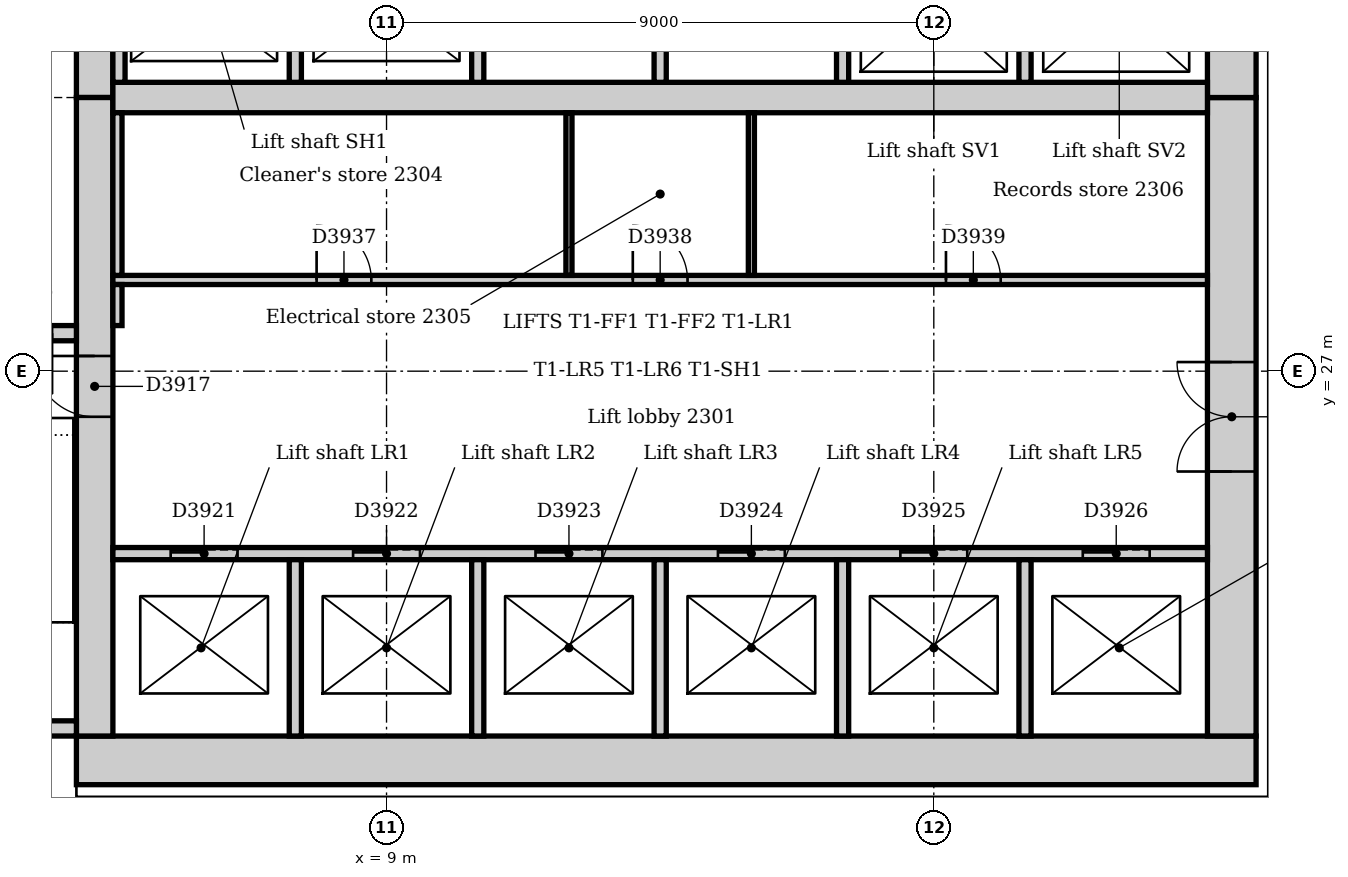
"""IFC4 building model, lengths in metres.
Left out: names, types, materials, properties, quantities, classifications, styles, units other than length and angle.
Written with IfcOpenShell. Run it as: python <this file> out.ifc"""

import sys

from ifc_helpers import new_model, si_unit, direction, frame, frame_2d, origin, place, context, subcontext, project, spatial, rectangle, extrude, element, fill, save


model = new_model("IFC4")
c1 = context("Model", 3, precision=1e-05, world=origin(), true_north=direction((0.0, 1.0)))
c2 = subcontext(c1, "Body", "Model", "MODEL_VIEW")
j1 = project(units=[si_unit("LENGTHUNIT", "METRE"), si_unit("PLANEANGLEUNIT", "RADIAN")], contexts=[c1])
p1 = place(None, origin())
s1 = spatial("IfcSite", under=j1, at=p1, CompositionType="ELEMENT")
p2 = place(p1, origin())
s2 = spatial("IfcBuilding", under=s1, at=p2, CompositionType="ELEMENT")
p3 = place(p2, frame((0.0, 0.0, 100.0)))
s3 = spatial("IfcBuildingStorey", under=s2, at=p3, CompositionType="ELEMENT", Elevation=100.0)
p4 = place(p3, frame((3.9, 20.6, 0.0), z_axis=(0.0, 0.0, 1.0), x_axis=(1.0, 0.0, 0.0)))
e1 = element("IfcWall", 1, at=p4, inside=s3, PredefinedType="SOLIDWALL", context=c2, shape_type="SweptSolid", body=[
    extrude(rectangle(XDim=19.4, YDim=0.8, at=frame_2d((9.7, 0.0))), origin(), (0.0, 0.0, 1.0), 4.0),
])
p5 = place(p3, frame((22.9, 21.0, 0.0), z_axis=(0.0, 0.0, 1.0), x_axis=(0.0, 1.0, 0.0)))
e2 = element("IfcWall", 2, at=p5, inside=s3, PredefinedType="SOLIDWALL", context=c2, shape_type="SweptSolid", body=[
    extrude(rectangle(XDim=10.5, YDim=0.8, at=frame_2d((5.25, 0.0))), origin(), (0.0, 0.0, 1.0), 4.0),
])
p6 = place(p5, frame((4.35, 0.0, 0.0)))
e3 = element("IfcOpeningElement", 3, at=p6, cuts=e2, PredefinedType="OPENING", context=c2, shape_type="SweptSolid", body=[
    extrude(rectangle(XDim=1.8, YDim=2.1, at=frame_2d((0.9, 1.05))), frame((0.0, 0.41, 0.0), z_axis=(0.0, -1.0, 0.0), x_axis=(1.0, 0.0, 0.0)), (0.0, 0.0, 1.0), 0.82),
])
p7 = place(p3, frame((22.9, 31.5, 0.0), z_axis=(0.0, 0.0, 1.0), x_axis=(0.0, 1.0, 0.0)))
e4 = element("IfcWall", 4, at=p7, inside=s3, PredefinedType="SOLIDWALL", context=c2, shape_type="SweptSolid", body=[
    extrude(rectangle(XDim=10.5, YDim=0.8, at=frame_2d((5.25, 0.0))), origin(), (0.0, 0.0, 1.0), 4.0),
])
p8 = place(p7, frame((3.15, 0.0, 0.0)))
e5 = element("IfcOpeningElement", 5, at=p8, cuts=e4, PredefinedType="OPENING", context=c2, shape_type="SweptSolid", body=[
    extrude(rectangle(XDim=1.0, YDim=2.1, at=frame_2d((0.5, 1.05))), frame((0.0, 0.41, 0.0), z_axis=(0.0, -1.0, 0.0), x_axis=(1.0, 0.0, 0.0)), (0.0, 0.0, 1.0), 0.82),
])
p9 = place(p7, frame((5.2, 0.0, 0.0)))
e6 = element("IfcOpeningElement", 6, at=p9, cuts=e4, PredefinedType="OPENING", context=c2, shape_type="SweptSolid", body=[
    extrude(rectangle(XDim=1.0, YDim=2.1, at=frame_2d((0.5, 1.05))), frame((0.0, 0.41, 0.0), z_axis=(0.0, -1.0, 0.0), x_axis=(1.0, 0.0, 0.0)), (0.0, 0.0, 1.0), 0.82),
])
p10 = place(p3, frame((4.2, 42.0, 0.0), z_axis=(0.0, 0.0, 1.0), x_axis=(0.0, -1.0, 0.0)))
e7 = element("IfcWall", 7, at=p10, inside=s3, PredefinedType="SOLIDWALL", context=c2, shape_type="SweptSolid", body=[
    extrude(rectangle(XDim=10.5, YDim=0.6, at=frame_2d((5.25, 0.0))), origin(), (0.0, 0.0, 1.0), 4.0),
])
p11 = place(p10, frame((5.3, 0.0, 0.0)))
e8 = element("IfcOpeningElement", 8, at=p11, cuts=e7, PredefinedType="OPENING", context=c2, shape_type="SweptSolid", body=[
    extrude(rectangle(XDim=1.0, YDim=2.1, at=frame_2d((0.5, 1.05))), frame((0.0, 0.31, 0.0), z_axis=(0.0, -1.0, 0.0), x_axis=(1.0, 0.0, 0.0)), (0.0, 0.0, 1.0), 0.62),
])
p12 = place(p3, frame((4.2, 31.5, 0.0), z_axis=(0.0, 0.0, 1.0), x_axis=(0.0, -1.0, 0.0)))
e9 = element("IfcWall", 9, at=p12, inside=s3, PredefinedType="SOLIDWALL", context=c2, shape_type="SweptSolid", body=[
    extrude(rectangle(XDim=10.5, YDim=0.6, at=frame_2d((5.25, 0.0))), origin(), (0.0, 0.0, 1.0), 4.0),
])
p13 = place(p12, frame((4.25, 0.0, 0.0)))
e10 = element("IfcOpeningElement", 10, at=p13, cuts=e9, PredefinedType="OPENING", context=c2, shape_type="SweptSolid", body=[
    extrude(rectangle(XDim=1.0, YDim=2.1, at=frame_2d((0.5, 1.05))), frame((0.0, 0.31, 0.0), z_axis=(0.0, -1.0, 0.0), x_axis=(1.0, 0.0, 0.0)), (0.0, 0.0, 1.0), 0.62),
])
p14 = place(p3, frame((4.5, 31.5, 0.0), z_axis=(0.0, 0.0, 1.0), x_axis=(1.0, 0.0, 0.0)))
e11 = element("IfcWall", 11, at=p14, inside=s3, PredefinedType="SOLIDWALL", context=c2, shape_type="SweptSolid", body=[
    extrude(rectangle(XDim=18.0, YDim=0.5, at=frame_2d((9.0, 0.0))), origin(), (0.0, 0.0, 1.0), 4.0),
])
p15 = place(p3, frame((0.36, 21.125, 0.0), z_axis=(0.0, 0.0, 1.0), x_axis=(1.0, 0.0, 0.0)))
e12 = element("IfcWall", 12, at=p15, inside=s3, PredefinedType="SOLIDWALL", context=c2, shape_type="SweptSolid", body=[
    extrude(rectangle(XDim=3.54, YDim=0.25, at=frame_2d((1.77, 0.0))), origin(), (0.0, 0.0, 1.0), 4.0),
])
p16 = place(p3, frame((3.9, 27.625, 0.0), z_axis=(0.0, 0.0, 1.0), x_axis=(-1.0, 0.0, 0.0)))
e13 = element("IfcWall", 13, at=p16, inside=s3, PredefinedType="SOLIDWALL", context=c2, shape_type="SweptSolid", body=[
    extrude(rectangle(XDim=3.54, YDim=0.25, at=frame_2d((1.77, 0.0))), origin(), (0.0, 0.0, 1.0), 4.0),
])
p17 = place(p16, frame((0.4, 0.0, 0.0)))
e14 = element("IfcOpeningElement", 14, at=p17, cuts=e13, PredefinedType="OPENING", context=c2, shape_type="SweptSolid", body=[
    extrude(rectangle(XDim=1.0, YDim=2.1, at=frame_2d((0.5, 1.05))), frame((0.0, 0.135, 0.0), z_axis=(0.0, -1.0, 0.0), x_axis=(1.0, 0.0, 0.0)), (0.0, 0.0, 1.0), 0.27),
])
p18 = place(p3, frame((4.5, 24.0, 0.0), z_axis=(0.0, 0.0, 1.0), x_axis=(1.0, 0.0, 0.0)))
e15 = element("IfcWall", 15, at=p18, inside=s3, PredefinedType="PARTITIONING", context=c2, shape_type="SweptSolid", body=[
    extrude(rectangle(XDim=18.0, YDim=0.2, at=frame_2d((9.0, 0.0))), origin(), (0.0, 0.0, 1.0), 3.85),
])
p19 = place(p18, frame((0.95, 0.0, 0.0)))
e16 = element("IfcOpeningElement", 16, at=p19, cuts=e15, PredefinedType="OPENING", context=c2, shape_type="SweptSolid", body=[
    extrude(rectangle(XDim=1.1, YDim=2.1, at=frame_2d((0.55, 1.05))), frame((0.0, 0.11, 0.0), z_axis=(0.0, -1.0, 0.0), x_axis=(1.0, 0.0, 0.0)), (0.0, 0.0, 1.0), 0.22),
])
p20 = place(p18, frame((3.95, 0.0, 0.0)))
e17 = element("IfcOpeningElement", 17, at=p20, cuts=e15, PredefinedType="OPENING", context=c2, shape_type="SweptSolid", body=[
    extrude(rectangle(XDim=1.1, YDim=2.1, at=frame_2d((0.55, 1.05))), frame((0.0, 0.11, 0.0), z_axis=(0.0, -1.0, 0.0), x_axis=(1.0, 0.0, 0.0)), (0.0, 0.0, 1.0), 0.22),
])
p21 = place(p18, frame((6.95, 0.0, 0.0)))
e18 = element("IfcOpeningElement", 18, at=p21, cuts=e15, PredefinedType="OPENING", context=c2, shape_type="SweptSolid", body=[
    extrude(rectangle(XDim=1.1, YDim=2.1, at=frame_2d((0.55, 1.05))), frame((0.0, 0.11, 0.0), z_axis=(0.0, -1.0, 0.0), x_axis=(1.0, 0.0, 0.0)), (0.0, 0.0, 1.0), 0.22),
])
p22 = place(p18, frame((9.95, 0.0, 0.0)))
e19 = element("IfcOpeningElement", 19, at=p22, cuts=e15, PredefinedType="OPENING", context=c2, shape_type="SweptSolid", body=[
    extrude(rectangle(XDim=1.1, YDim=2.1, at=frame_2d((0.55, 1.05))), frame((0.0, 0.11, 0.0), z_axis=(0.0, -1.0, 0.0), x_axis=(1.0, 0.0, 0.0)), (0.0, 0.0, 1.0), 0.22),
])
p23 = place(p18, frame((12.95, 0.0, 0.0)))
e20 = element("IfcOpeningElement", 20, at=p23, cuts=e15, PredefinedType="OPENING", context=c2, shape_type="SweptSolid", body=[
    extrude(rectangle(XDim=1.1, YDim=2.1, at=frame_2d((0.55, 1.05))), frame((0.0, 0.11, 0.0), z_axis=(0.0, -1.0, 0.0), x_axis=(1.0, 0.0, 0.0)), (0.0, 0.0, 1.0), 0.22),
])
p24 = place(p18, frame((15.95, 0.0, 0.0)))
e21 = element("IfcOpeningElement", 21, at=p24, cuts=e15, PredefinedType="OPENING", context=c2, shape_type="SweptSolid", body=[
    extrude(rectangle(XDim=1.1, YDim=2.1, at=frame_2d((0.55, 1.05))), frame((0.0, 0.11, 0.0), z_axis=(0.0, -1.0, 0.0), x_axis=(1.0, 0.0, 0.0)), (0.0, 0.0, 1.0), 0.22),
])
p25 = place(p3, frame((4.6, 31.75, 0.0), z_axis=(0.0, 0.0, 1.0), x_axis=(0.0, 1.0, 0.0)))
e22 = element("IfcWall", 22, at=p25, inside=s3, PredefinedType="PARTITIONING", context=c2, shape_type="SweptSolid", body=[
    extrude(rectangle(XDim=2.65, YDim=0.2, at=frame_2d((1.325, 0.0))), origin(), (0.0, 0.0, 1.0), 3.85),
])
p26 = place(p3, frame((7.5, 21.0, 0.0), z_axis=(0.0, 0.0, 1.0), x_axis=(0.0, 1.0, 0.0)))
e23 = element("IfcWall", 23, at=p26, inside=s3, PredefinedType="PARTITIONING", context=c2, shape_type="SweptSolid", body=[
    extrude(rectangle(XDim=2.9, YDim=0.2, at=frame_2d((1.45, 0.0))), origin(), (0.0, 0.0, 1.0), 3.85),
])
p27 = place(p3, frame((7.5, 31.75, 0.0), z_axis=(0.0, 0.0, 1.0), x_axis=(0.0, 1.0, 0.0)))
e24 = element("IfcWall", 24, at=p27, inside=s3, PredefinedType="PARTITIONING", context=c2, shape_type="SweptSolid", body=[
    extrude(rectangle(XDim=2.65, YDim=0.2, at=frame_2d((1.325, 0.0))), origin(), (0.0, 0.0, 1.0), 3.85),
])
p28 = place(p3, frame((10.5, 21.0, 0.0), z_axis=(0.0, 0.0, 1.0), x_axis=(0.0, 1.0, 0.0)))
e25 = element("IfcWall", 25, at=p28, inside=s3, PredefinedType="PARTITIONING", context=c2, shape_type="SweptSolid", body=[
    extrude(rectangle(XDim=2.9, YDim=0.2, at=frame_2d((1.45, 0.0))), origin(), (0.0, 0.0, 1.0), 3.85),
])
p29 = place(p3, frame((10.5, 31.75, 0.0), z_axis=(0.0, 0.0, 1.0), x_axis=(0.0, 1.0, 0.0)))
e26 = element("IfcWall", 26, at=p29, inside=s3, PredefinedType="PARTITIONING", context=c2, shape_type="SweptSolid", body=[
    extrude(rectangle(XDim=2.65, YDim=0.2, at=frame_2d((1.325, 0.0))), origin(), (0.0, 0.0, 1.0), 3.85),
])
p30 = place(p3, frame((13.5, 21.0, 0.0), z_axis=(0.0, 0.0, 1.0), x_axis=(0.0, 1.0, 0.0)))
e27 = element("IfcWall", 27, at=p30, inside=s3, PredefinedType="PARTITIONING", context=c2, shape_type="SweptSolid", body=[
    extrude(rectangle(XDim=2.9, YDim=0.2, at=frame_2d((1.45, 0.0))), origin(), (0.0, 0.0, 1.0), 3.85),
])
p31 = place(p3, frame((13.5, 31.75, 0.0), z_axis=(0.0, 0.0, 1.0), x_axis=(0.0, 1.0, 0.0)))
e28 = element("IfcWall", 28, at=p31, inside=s3, PredefinedType="PARTITIONING", context=c2, shape_type="SweptSolid", body=[
    extrude(rectangle(XDim=2.65, YDim=0.2, at=frame_2d((1.325, 0.0))), origin(), (0.0, 0.0, 1.0), 3.85),
])
p32 = place(p3, frame((16.5, 21.0, 0.0), z_axis=(0.0, 0.0, 1.0), x_axis=(0.0, 1.0, 0.0)))
e29 = element("IfcWall", 29, at=p32, inside=s3, PredefinedType="PARTITIONING", context=c2, shape_type="SweptSolid", body=[
    extrude(rectangle(XDim=2.9, YDim=0.2, at=frame_2d((1.45, 0.0))), origin(), (0.0, 0.0, 1.0), 3.85),
])
p33 = place(p3, frame((16.5, 31.75, 0.0), z_axis=(0.0, 0.0, 1.0), x_axis=(0.0, 1.0, 0.0)))
e30 = element("IfcWall", 30, at=p33, inside=s3, PredefinedType="PARTITIONING", context=c2, shape_type="SweptSolid", body=[
    extrude(rectangle(XDim=2.65, YDim=0.2, at=frame_2d((1.325, 0.0))), origin(), (0.0, 0.0, 1.0), 3.85),
])
p34 = place(p3, frame((19.5, 21.0, 0.0), z_axis=(0.0, 0.0, 1.0), x_axis=(0.0, 1.0, 0.0)))
e31 = element("IfcWall", 31, at=p34, inside=s3, PredefinedType="PARTITIONING", context=c2, shape_type="SweptSolid", body=[
    extrude(rectangle(XDim=2.9, YDim=0.2, at=frame_2d((1.45, 0.0))), origin(), (0.0, 0.0, 1.0), 3.85),
])
p35 = place(p3, frame((19.5, 31.75, 0.0), z_axis=(0.0, 0.0, 1.0), x_axis=(0.0, 1.0, 0.0)))
e32 = element("IfcWall", 32, at=p35, inside=s3, PredefinedType="PARTITIONING", context=c2, shape_type="SweptSolid", body=[
    extrude(rectangle(XDim=2.65, YDim=0.2, at=frame_2d((1.325, 0.0))), origin(), (0.0, 0.0, 1.0), 3.85),
])
p36 = place(p3, frame((4.5, 28.5, 0.0), z_axis=(0.0, 0.0, 1.0), x_axis=(1.0, 0.0, 0.0)))
e33 = element("IfcWall", 33, at=p36, inside=s3, PredefinedType="PARTITIONING", context=c2, shape_type="SweptSolid", body=[
    extrude(rectangle(XDim=18.0, YDim=0.15, at=frame_2d((9.0, 0.0))), origin(), (0.0, 0.0, 1.0), 3.85),
])
p37 = place(p36, frame((3.35, 0.0, 0.0)))
e34 = element("IfcOpeningElement", 34, at=p37, cuts=e33, PredefinedType="OPENING", context=c2, shape_type="SweptSolid", body=[
    extrude(rectangle(XDim=0.9, YDim=2.1, at=frame_2d((0.45, 1.05))), frame((0.0, 0.085, 0.0), z_axis=(0.0, -1.0, 0.0), x_axis=(1.0, 0.0, 0.0)), (0.0, 0.0, 1.0), 0.17),
])
p38 = place(p36, frame((8.55, 0.0, 0.0)))
e35 = element("IfcOpeningElement", 35, at=p38, cuts=e33, PredefinedType="OPENING", context=c2, shape_type="SweptSolid", body=[
    extrude(rectangle(XDim=0.9, YDim=2.1, at=frame_2d((0.45, 1.05))), frame((0.0, 0.085, 0.0), z_axis=(0.0, -1.0, 0.0), x_axis=(1.0, 0.0, 0.0)), (0.0, 0.0, 1.0), 0.17),
])
p39 = place(p36, frame((13.7, 0.0, 0.0)))
e36 = element("IfcOpeningElement", 36, at=p39, cuts=e33, PredefinedType="OPENING", context=c2, shape_type="SweptSolid", body=[
    extrude(rectangle(XDim=0.9, YDim=2.1, at=frame_2d((0.45, 1.05))), frame((0.0, 0.085, 0.0), z_axis=(0.0, -1.0, 0.0), x_axis=(1.0, 0.0, 0.0)), (0.0, 0.0, 1.0), 0.17),
])
p40 = place(p3, frame((4.575, 27.75, 0.0), z_axis=(0.0, 0.0, 1.0), x_axis=(0.0, 1.0, 0.0)))
e37 = element("IfcWall", 37, at=p40, inside=s3, PredefinedType="PARTITIONING", context=c2, shape_type="SweptSolid", body=[
    extrude(rectangle(XDim=0.675, YDim=0.15, at=frame_2d((0.338, 0.0))), origin(), (0.0, 0.0, 1.0), 3.85),
])
p41 = place(p3, frame((4.575, 28.575, 0.0), z_axis=(0.0, 0.0, 1.0), x_axis=(0.0, 1.0, 0.0)))
e38 = element("IfcWall", 38, at=p41, inside=s3, PredefinedType="PARTITIONING", context=c2, shape_type="SweptSolid", body=[
    extrude(rectangle(XDim=2.675, YDim=0.15, at=frame_2d((1.337, 0.0))), origin(), (0.0, 0.0, 1.0), 3.85),
])
for number, where, z_axis, x_axis in (
    (39, (12.0, 28.575, 0.0), (0.0, 0.0, 1.0), (0.0, 1.0, 0.0)),
    (40, (15.0, 28.575, 0.0), (0.0, 0.0, 1.0), (0.0, 1.0, 0.0)),
):
    element("IfcWall", number, at=place(p3, frame(where, z_axis=z_axis, x_axis=x_axis)), inside=s3, PredefinedType="PARTITIONING", context=c2, shape_type="SweptSolid", body=[
        extrude(rectangle(XDim=2.675, YDim=0.1, at=frame_2d((1.337, 0.0))), origin(), (0.0, 0.0, 1.0), 3.85),
    ])
p42 = place(p13, frame((1.0, 0.0, 0.0), z_axis=(0.0, 0.0, 1.0), x_axis=(-1.0, 0.0, 0.0)))
e41 = element("IfcDoor", 41, at=p42, inside=s3, OperationType="SINGLE_SWING_RIGHT", PredefinedType="DOOR", context=c2, shape_type="SweptSolid", body=[
    extrude(rectangle(XDim=1.0, YDim=2.1, at=frame_2d((0.5, 1.05))), frame((0.0, 0.025, 0.0), z_axis=(0.0, -1.0, 0.0), x_axis=(1.0, 0.0, 0.0)), (0.0, 0.0, 1.0), 0.05),
])
fill(e10, e41)
p43 = place(p19, origin())
e42 = element("IfcDoor", 42, at=p43, inside=s3, OperationType="SLIDING_TO_LEFT", PredefinedType="DOOR", context=c2, shape_type="SweptSolid", body=[
    extrude(rectangle(XDim=1.1, YDim=2.1, at=frame_2d((0.55, 1.05))), frame((0.0, 0.025, 0.0), z_axis=(0.0, -1.0, 0.0), x_axis=(1.0, 0.0, 0.0)), (0.0, 0.0, 1.0), 0.05),
])
fill(e16, e42)
p44 = place(p20, origin())
e43 = element("IfcDoor", 43, at=p44, inside=s3, OperationType="SLIDING_TO_LEFT", PredefinedType="DOOR", context=c2, shape_type="SweptSolid", body=[
    extrude(rectangle(XDim=1.1, YDim=2.1, at=frame_2d((0.55, 1.05))), frame((0.0, 0.025, 0.0), z_axis=(0.0, -1.0, 0.0), x_axis=(1.0, 0.0, 0.0)), (0.0, 0.0, 1.0), 0.05),
])
fill(e17, e43)
p45 = place(p21, origin())
e44 = element("IfcDoor", 44, at=p45, inside=s3, OperationType="SLIDING_TO_LEFT", PredefinedType="DOOR", context=c2, shape_type="SweptSolid", body=[
    extrude(rectangle(XDim=1.1, YDim=2.1, at=frame_2d((0.55, 1.05))), frame((0.0, 0.025, 0.0), z_axis=(0.0, -1.0, 0.0), x_axis=(1.0, 0.0, 0.0)), (0.0, 0.0, 1.0), 0.05),
])
fill(e18, e44)
p46 = place(p22, origin())
e45 = element("IfcDoor", 45, at=p46, inside=s3, OperationType="SLIDING_TO_LEFT", PredefinedType="DOOR", context=c2, shape_type="SweptSolid", body=[
    extrude(rectangle(XDim=1.1, YDim=2.1, at=frame_2d((0.55, 1.05))), frame((0.0, 0.025, 0.0), z_axis=(0.0, -1.0, 0.0), x_axis=(1.0, 0.0, 0.0)), (0.0, 0.0, 1.0), 0.05),
])
fill(e19, e45)
p47 = place(p23, origin())
e46 = element("IfcDoor", 46, at=p47, inside=s3, OperationType="SLIDING_TO_LEFT", PredefinedType="DOOR", context=c2, shape_type="SweptSolid", body=[
    extrude(rectangle(XDim=1.1, YDim=2.1, at=frame_2d((0.55, 1.05))), frame((0.0, 0.025, 0.0), z_axis=(0.0, -1.0, 0.0), x_axis=(1.0, 0.0, 0.0)), (0.0, 0.0, 1.0), 0.05),
])
fill(e20, e46)
p48 = place(p24, origin())
e47 = element("IfcDoor", 47, at=p48, inside=s3, OperationType="SLIDING_TO_LEFT", PredefinedType="DOOR", context=c2, shape_type="SweptSolid", body=[
    extrude(rectangle(XDim=1.1, YDim=2.1, at=frame_2d((0.55, 1.05))), frame((0.0, 0.025, 0.0), z_axis=(0.0, -1.0, 0.0), x_axis=(1.0, 0.0, 0.0)), (0.0, 0.0, 1.0), 0.05),
])
fill(e21, e47)
p49 = place(p6, origin())
e48 = element("IfcDoor", 48, at=p49, inside=s3, OperationType="DOUBLE_DOOR_DOUBLE_SWING", PredefinedType="DOOR", context=c2, shape_type="SweptSolid", body=[
    extrude(rectangle(XDim=1.8, YDim=2.1, at=frame_2d((0.9, 1.05))), frame((0.0, 0.025, 0.0), z_axis=(0.0, -1.0, 0.0), x_axis=(1.0, 0.0, 0.0)), (0.0, 0.0, 1.0), 0.05),
])
fill(e3, e48)
p50 = place(p37, origin())
e49 = element("IfcDoor", 49, at=p50, inside=s3, OperationType="SINGLE_SWING_LEFT", PredefinedType="DOOR", context=c2, shape_type="SweptSolid", body=[
    extrude(rectangle(XDim=0.9, YDim=2.1, at=frame_2d((0.45, 1.05))), frame((0.0, 0.025, 0.0), z_axis=(0.0, -1.0, 0.0), x_axis=(1.0, 0.0, 0.0)), (0.0, 0.0, 1.0), 0.05),
])
fill(e34, e49)
p51 = place(p38, origin())
e50 = element("IfcDoor", 50, at=p51, inside=s3, OperationType="SINGLE_SWING_LEFT", PredefinedType="DOOR", context=c2, shape_type="SweptSolid", body=[
    extrude(rectangle(XDim=0.9, YDim=2.1, at=frame_2d((0.45, 1.05))), frame((0.0, 0.025, 0.0), z_axis=(0.0, -1.0, 0.0), x_axis=(1.0, 0.0, 0.0)), (0.0, 0.0, 1.0), 0.05),
])
fill(e35, e50)
p52 = place(p39, origin())
e51 = element("IfcDoor", 51, at=p52, inside=s3, OperationType="SINGLE_SWING_LEFT", PredefinedType="DOOR", context=c2, shape_type="SweptSolid", body=[
    extrude(rectangle(XDim=0.9, YDim=2.1, at=frame_2d((0.45, 1.05))), frame((0.0, 0.025, 0.0), z_axis=(0.0, -1.0, 0.0), x_axis=(1.0, 0.0, 0.0)), (0.0, 0.0, 1.0), 0.05),
])
fill(e36, e51)
save(model, sys.argv[1])
